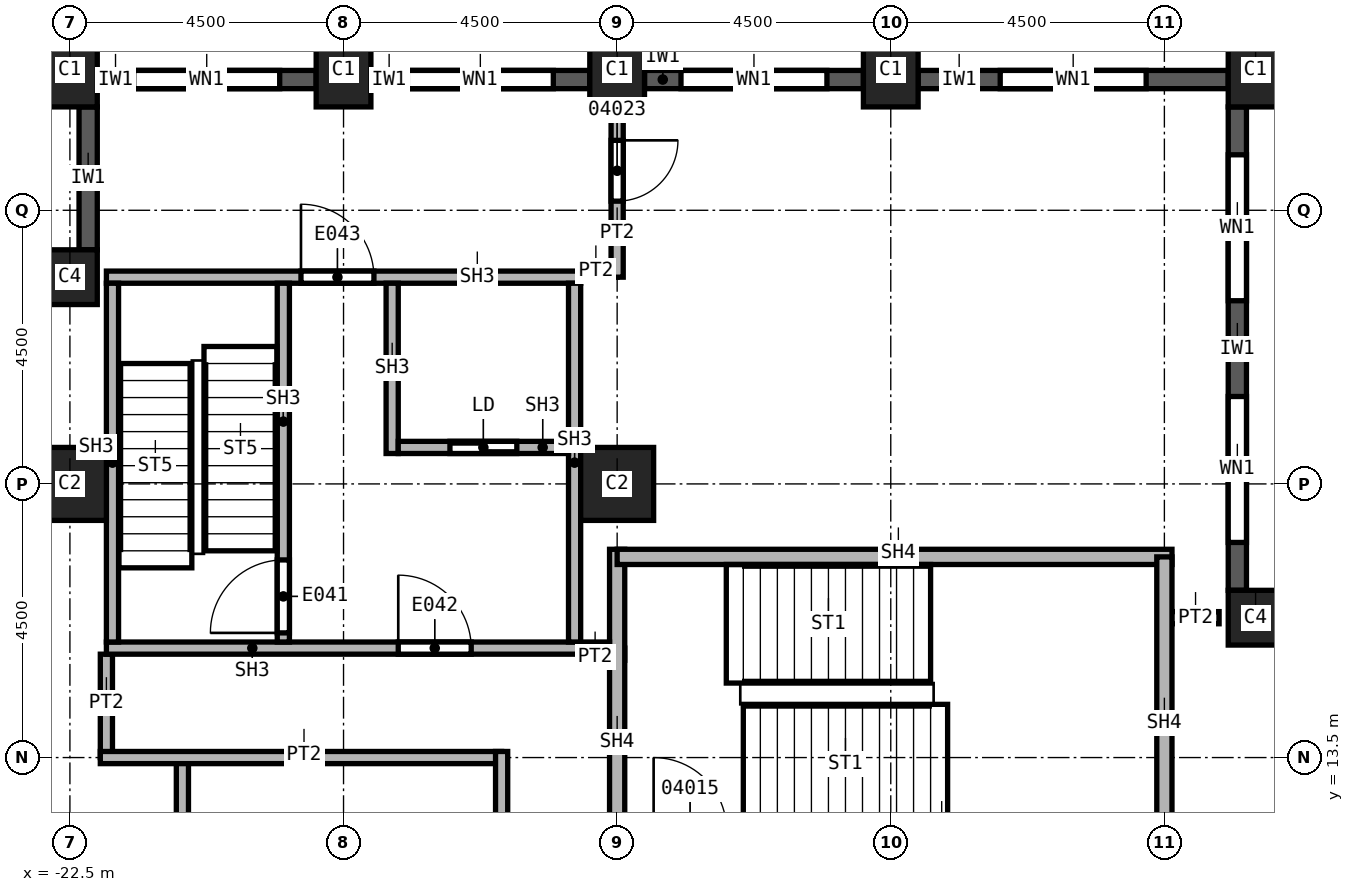
"""IFC4 building model, lengths in metres.
Left out: names, types, materials, properties, quantities, classifications, styles, units other than length and angle.
Written with IfcOpenShell. Run it as: python <this file> out.ifc"""

import sys

from ifc_helpers import new_model, si_unit, direction, frame, frame_2d, origin, origin_2d, place, context, subcontext, project, spatial, rectangle, extrude, element, fill, save


model = new_model("IFC4")
c1 = context("Model", 3, precision=1e-05, world=origin(), true_north=direction((0.0, 1.0)))
c2 = subcontext(c1, "Body", "Model", "MODEL_VIEW")
j1 = project(units=[si_unit("LENGTHUNIT", "METRE"), si_unit("PLANEANGLEUNIT", "RADIAN")], contexts=[c1])
p1 = place(None, origin())
s1 = spatial("IfcSite", under=j1, at=p1, CompositionType="ELEMENT")
p2 = place(p1, origin())
s2 = spatial("IfcBuilding", under=s1, at=p2, CompositionType="ELEMENT")
p3 = place(p2, frame((0.0, 0.0, 104.0)))
s3 = spatial("IfcBuildingStorey", under=s2, at=p3, CompositionType="ELEMENT", Elevation=104.0)
for number, where, z_axis, x_axis in (
    (1, (-13.5, 18.0, 0.0), (0.0, 0.0, 1.0), (1.0, 0.0, 0.0)),
    (2, (-22.5, 18.0, 0.0), (0.0, 0.0, 1.0), (1.0, 0.0, 0.0)),
):
    element("IfcColumn", number, at=place(p3, frame(where, z_axis=z_axis, x_axis=x_axis)), inside=s3, PredefinedType="COLUMN", context=c2, shape_type="SweptSolid", body=[
        extrude(rectangle(XDim=1.2, YDim=1.2, at=origin_2d()), origin(), (0.0, 0.0, 1.0), 3.7),
    ])
for number, where, z_axis, x_axis in (
    (3, (-3.0, 24.8, 0.0), (0.0, 0.0, 1.0), (1.0, 0.0, 0.0)),
    (4, (-9.0, 24.8, 0.0), (0.0, 0.0, 1.0), (1.0, 0.0, 0.0)),
    (5, (-13.5, 24.8, 0.0), (0.0, 0.0, 1.0), (1.0, 0.0, 0.0)),
    (6, (-18.0, 24.8, 0.0), (0.0, 0.0, 1.0), (1.0, 0.0, 0.0)),
    (7, (-22.5, 24.8, 0.0), (0.0, 0.0, 1.0), (1.0, 0.0, 0.0)),
):
    element("IfcColumn", number, at=place(p3, frame(where, z_axis=z_axis, x_axis=x_axis)), inside=s3, PredefinedType="COLUMN", context=c2, shape_type="SweptSolid", body=[
        extrude(rectangle(XDim=0.9, YDim=1.2, at=origin_2d()), origin(), (0.0, 0.0, 1.0), 3.7),
    ])
for number, where, z_axis, x_axis in (
    (8, (-3.0, 15.8, 0.0), (0.0, 0.0, 1.0), (1.0, 0.0, 0.0)),
    (9, (-22.5, 21.4, 0.0), (0.0, 0.0, 1.0), (1.0, 0.0, 0.0)),
):
    element("IfcColumn", number, at=place(p3, frame(where, z_axis=z_axis, x_axis=x_axis)), inside=s3, PredefinedType="COLUMN", context=c2, shape_type="SweptSolid", body=[
        extrude(rectangle(XDim=0.9, YDim=0.9, at=origin_2d()), origin(), (0.0, 0.0, 1.0), 3.7),
    ])
p4 = place(p3, frame((-22.2, 24.2, 0.0), z_axis=(0.0, 0.0, 1.0), x_axis=(0.0, -1.0, 0.0)))
e10 = element("IfcWall", 10, at=p4, inside=s3, PredefinedType="SOLIDWALL", context=c2, shape_type="SweptSolid", body=[
    extrude(rectangle(XDim=2.35, YDim=0.3, at=frame_2d((1.175, 0.0))), origin(), (0.0, 0.0, 1.0), 3.1),
])
p5 = place(p3, frame((-3.3, 16.25, 0.0), z_axis=(0.0, 0.0, 1.0), x_axis=(0.0, 1.0, 0.0)))
e11 = element("IfcWall", 11, at=p5, inside=s3, PredefinedType="SOLIDWALL", context=c2, shape_type="SweptSolid", body=[
    extrude(rectangle(XDim=7.95, YDim=0.3, at=frame_2d((3.975, 0.0))), origin(), (0.0, 0.0, 1.0), 3.1),
])
p6 = place(p5, frame((0.788, 0.0, 0.8)))
e12 = element("IfcOpeningElement", 12, at=p6, cuts=e11, PredefinedType="OPENING", context=c2, shape_type="SweptSolid", body=[
    extrude(rectangle(XDim=2.4, YDim=1.95, at=frame_2d((1.2, 0.975))), frame((0.0, 0.15, 0.0), z_axis=(0.0, -1.0, 0.0), x_axis=(1.0, 0.0, 0.0)), (0.0, 0.0, 1.0), 0.3),
])
p7 = place(p5, frame((4.762, 0.0, 0.8)))
e13 = element("IfcOpeningElement", 13, at=p7, cuts=e11, PredefinedType="OPENING", context=c2, shape_type="SweptSolid", body=[
    extrude(rectangle(XDim=2.4, YDim=1.95, at=frame_2d((1.2, 0.975))), frame((0.0, 0.15, 0.0), z_axis=(0.0, -1.0, 0.0), x_axis=(1.0, 0.0, 0.0)), (0.0, 0.0, 1.0), 0.3),
])
p8 = place(p3, frame((-3.45, 24.65, 0.0), z_axis=(0.0, 0.0, 1.0), x_axis=(-1.0, 0.0, 0.0)))
e14 = element("IfcWall", 14, at=p8, inside=s3, PredefinedType="SOLIDWALL", context=c2, shape_type="SweptSolid", body=[
    extrude(rectangle(XDim=5.1, YDim=0.3, at=frame_2d((2.55, 0.0))), origin(), (0.0, 0.0, 1.0), 3.1),
])
p9 = place(p8, frame((1.35, 0.0, 0.8)))
e15 = element("IfcOpeningElement", 15, at=p9, cuts=e14, PredefinedType="OPENING", context=c2, shape_type="SweptSolid", body=[
    extrude(rectangle(XDim=2.4, YDim=1.95, at=frame_2d((1.2, 0.975))), frame((0.0, 0.15, 0.0), z_axis=(0.0, -1.0, 0.0), x_axis=(1.0, 0.0, 0.0)), (0.0, 0.0, 1.0), 0.3),
])
p10 = place(p3, frame((-9.45, 24.65, 0.0), z_axis=(0.0, 0.0, 1.0), x_axis=(-1.0, 0.0, 0.0)))
e16 = element("IfcWall", 16, at=p10, inside=s3, PredefinedType="SOLIDWALL", context=c2, shape_type="SweptSolid", body=[
    extrude(rectangle(XDim=3.6, YDim=0.3, at=frame_2d((1.8, 0.0))), origin(), (0.0, 0.0, 1.0), 3.1),
])
p11 = place(p10, frame((0.6, 0.0, 0.8)))
e17 = element("IfcOpeningElement", 17, at=p11, cuts=e16, PredefinedType="OPENING", context=c2, shape_type="SweptSolid", body=[
    extrude(rectangle(XDim=2.4, YDim=1.95, at=frame_2d((1.2, 0.975))), frame((0.0, 0.15, 0.0), z_axis=(0.0, -1.0, 0.0), x_axis=(1.0, 0.0, 0.0)), (0.0, 0.0, 1.0), 0.3),
])
p12 = place(p3, frame((-13.95, 24.65, 0.0), z_axis=(0.0, 0.0, 1.0), x_axis=(-1.0, 0.0, 0.0)))
e18 = element("IfcWall", 18, at=p12, inside=s3, PredefinedType="SOLIDWALL", context=c2, shape_type="SweptSolid", body=[
    extrude(rectangle(XDim=3.6, YDim=0.3, at=frame_2d((1.8, 0.0))), origin(), (0.0, 0.0, 1.0), 3.1),
])
p13 = place(p12, frame((0.6, 0.0, 0.8)))
e19 = element("IfcOpeningElement", 19, at=p13, cuts=e18, PredefinedType="OPENING", context=c2, shape_type="SweptSolid", body=[
    extrude(rectangle(XDim=2.4, YDim=1.95, at=frame_2d((1.2, 0.975))), frame((0.0, 0.15, 0.0), z_axis=(0.0, -1.0, 0.0), x_axis=(1.0, 0.0, 0.0)), (0.0, 0.0, 1.0), 0.3),
])
p14 = place(p3, frame((-18.45, 24.65, 0.0), z_axis=(0.0, 0.0, 1.0), x_axis=(-1.0, 0.0, 0.0)))
e20 = element("IfcWall", 20, at=p14, inside=s3, PredefinedType="SOLIDWALL", context=c2, shape_type="SweptSolid", body=[
    extrude(rectangle(XDim=3.6, YDim=0.3, at=frame_2d((1.8, 0.0))), origin(), (0.0, 0.0, 1.0), 3.1),
])
p15 = place(p14, frame((0.6, 0.0, 0.8)))
e21 = element("IfcOpeningElement", 21, at=p15, cuts=e20, PredefinedType="OPENING", context=c2, shape_type="SweptSolid", body=[
    extrude(rectangle(XDim=2.4, YDim=1.95, at=frame_2d((1.2, 0.975))), frame((0.0, 0.15, 0.0), z_axis=(0.0, -1.0, 0.0), x_axis=(1.0, 0.0, 0.0)), (0.0, 0.0, 1.0), 0.3),
])
p16 = place(p3, frame((-21.9, 13.5, 0.0), z_axis=(0.0, 0.0, 1.0), x_axis=(0.0, 1.0, 0.0)))
e22 = element("IfcWall", 22, at=p16, inside=s3, PredefinedType="PARTITIONING", context=c2, shape_type="SweptSolid", body=[
    extrude(rectangle(XDim=1.7, YDim=0.2, at=frame_2d((0.85, 0.0))), origin(), (0.0, 0.0, 1.0), 3.7),
])
p17 = place(p3, frame((-20.65, 3.75, 0.0), z_axis=(0.0, 0.0, 1.0), x_axis=(0.0, 1.0, 0.0)))
e23 = element("IfcWall", 23, at=p17, inside=s3, PredefinedType="PARTITIONING", context=c2, shape_type="SweptSolid", body=[
    extrude(rectangle(XDim=9.75, YDim=0.2, at=frame_2d((4.875, 0.0))), origin(), (0.0, 0.0, 1.0), 3.7),
])
p18 = place(p17, frame((6.1, 0.0, 0.0)))
e24 = element("IfcOpeningElement", 24, at=p18, cuts=e23, PredefinedType="OPENING", context=c2, shape_type="SweptSolid", body=[
    extrude(rectangle(XDim=1.0, YDim=2.1, at=frame_2d((0.5, 1.05))), frame((0.0, 0.1, 0.0), z_axis=(0.0, -1.0, 0.0), x_axis=(1.0, 0.0, 0.0)), (0.0, 0.0, 1.0), 0.2),
])
p19 = place(p3, frame((-15.4, 13.5, 0.0), z_axis=(0.0, 0.0, 1.0), x_axis=(-1.0, 0.0, 0.0)))
e25 = element("IfcWall", 25, at=p19, inside=s3, PredefinedType="PARTITIONING", context=c2, shape_type="SweptSolid", body=[
    extrude(rectangle(XDim=6.6, YDim=0.2, at=frame_2d((3.3, 0.0))), origin(), (0.0, 0.0, 1.0), 3.7),
])
p20 = place(p3, frame((-15.4, 3.65, 0.0), z_axis=(0.0, 0.0, 1.0), x_axis=(0.0, 1.0, 0.0)))
e26 = element("IfcWall", 26, at=p20, inside=s3, PredefinedType="PARTITIONING", context=c2, shape_type="SweptSolid", body=[
    extrude(rectangle(XDim=9.95, YDim=0.2, at=frame_2d((4.975, 0.0))), origin(), (0.0, 0.0, 1.0), 3.7),
])
p21 = place(p20, frame((7.15, 0.0, 0.0)))
e27 = element("IfcOpeningElement", 27, at=p21, cuts=e26, PredefinedType="OPENING", context=c2, shape_type="SweptSolid", body=[
    extrude(rectangle(XDim=1.0, YDim=2.1, at=frame_2d((0.5, 1.05))), frame((0.0, 0.1, 0.0), z_axis=(0.0, -1.0, 0.0), x_axis=(1.0, 0.0, 0.0)), (0.0, 0.0, 1.0), 0.2),
])
p22 = place(p3, frame((-14.1, 15.2, 0.0), z_axis=(0.0, 0.0, 1.0), x_axis=(1.0, 0.0, 0.0)))
e28 = element("IfcWall", 28, at=p22, inside=s3, PredefinedType="PARTITIONING", context=c2, shape_type="SweptSolid", body=[
    extrude(rectangle(XDim=0.725, YDim=0.2, at=frame_2d((0.363, 0.0))), origin(), (0.0, 0.0, 1.0), 3.7),
])
p23 = place(p3, frame((-13.5, 21.5, 0.0), z_axis=(0.0, 0.0, 1.0), x_axis=(-1.0, 0.0, 0.0)))
e29 = element("IfcWall", 29, at=p23, inside=s3, PredefinedType="PARTITIONING", context=c2, shape_type="SweptSolid", body=[
    extrude(rectangle(XDim=0.6, YDim=0.2, at=frame_2d((0.3, 0.0))), origin(), (0.0, 0.0, 1.0), 3.7),
])
p24 = place(p3, frame((-13.5, 24.2, 0.0), z_axis=(0.0, 0.0, 1.0), x_axis=(0.0, -1.0, 0.0)))
e30 = element("IfcWall", 30, at=p24, inside=s3, PredefinedType="PARTITIONING", context=c2, shape_type="SweptSolid", body=[
    extrude(rectangle(XDim=2.8, YDim=0.2, at=frame_2d((1.4, 0.0))), origin(), (0.0, 0.0, 1.0), 3.7),
])
p25 = place(p24, frame((0.55, 0.0, 0.0)))
e31 = element("IfcOpeningElement", 31, at=p25, cuts=e30, PredefinedType="OPENING", context=c2, shape_type="SweptSolid", body=[
    extrude(rectangle(XDim=1.0, YDim=2.1, at=frame_2d((0.5, 1.05))), frame((0.0, 0.1, 0.0), z_axis=(0.0, -1.0, 0.0), x_axis=(1.0, 0.0, 0.0)), (0.0, 0.0, 1.0), 0.2),
])
p26 = place(p3, frame((-4.5, 15.8, 0.0), z_axis=(0.0, 0.0, 1.0), x_axis=(1.0, 0.0, 0.0)))
e32 = element("IfcWall", 32, at=p26, inside=s3, PredefinedType="PARTITIONING", context=c2, shape_type="SweptSolid", body=[
    extrude(rectangle(XDim=0.9, YDim=0.2, at=frame_2d((0.45, 0.0))), origin(), (0.0, 0.0, 1.0), 3.7),
])
p27 = place(p3, frame((-13.5, 12.175, 0.0), z_axis=(0.0, 0.0, 1.0), x_axis=(0.0, 1.0, 0.0)))
e33 = element("IfcWall", 33, at=p27, inside=s3, PredefinedType="SOLIDWALL", context=c2, shape_type="SweptSolid", body=[
    extrude(rectangle(XDim=4.75, YDim=0.25, at=frame_2d((2.375, 0.0))), origin(), (0.0, 0.0, 1.0), 3.7),
])
p28 = place(p3, frame((-13.5, 16.8, 0.0), z_axis=(0.0, 0.0, 1.0), x_axis=(1.0, 0.0, 0.0)))
e34 = element("IfcWall", 34, at=p28, inside=s3, PredefinedType="SOLIDWALL", context=c2, shape_type="SweptSolid", body=[
    extrude(rectangle(XDim=9.125, YDim=0.25, at=frame_2d((4.562, 0.0))), origin(), (0.0, 0.0, 1.0), 3.7),
])
p29 = place(p3, frame((-4.5, 16.8, 0.0), z_axis=(0.0, 0.0, 1.0), x_axis=(0.0, -1.0, 0.0)))
e35 = element("IfcWall", 35, at=p29, inside=s3, PredefinedType="SOLIDWALL", context=c2, shape_type="SweptSolid", body=[
    extrude(rectangle(XDim=4.5, YDim=0.25, at=frame_2d((2.25, 0.0))), origin(), (0.0, 0.0, 1.0), 3.7),
])
p30 = place(p3, frame((-21.9, 15.3, 0.0), z_axis=(0.0, 0.0, 1.0), x_axis=(1.0, 0.0, 0.0)))
e36 = element("IfcWall", 36, at=p30, inside=s3, PredefinedType="SOLIDWALL", context=c2, shape_type="SweptSolid", body=[
    extrude(rectangle(XDim=8.275, YDim=0.2, at=frame_2d((4.137, 0.0))), origin(), (0.0, 0.0, 1.0), 3.7),
])
p31 = place(p30, frame((4.8, 0.0, 0.0)))
e37 = element("IfcOpeningElement", 37, at=p31, cuts=e36, PredefinedType="OPENING", context=c2, shape_type="SweptSolid", body=[
    extrude(rectangle(XDim=1.2, YDim=2.1, at=frame_2d((0.6, 1.05))), frame((0.0, 0.1, 0.0), z_axis=(0.0, -1.0, 0.0), x_axis=(1.0, 0.0, 0.0)), (0.0, 0.0, 1.0), 0.2),
])
p32 = place(p3, frame((-21.9, 21.4, 0.0), z_axis=(0.0, 0.0, 1.0), x_axis=(1.0, 0.0, 0.0)))
e38 = element("IfcWall", 38, at=p32, inside=s3, PredefinedType="SOLIDWALL", context=c2, shape_type="SweptSolid", body=[
    extrude(rectangle(XDim=7.8, YDim=0.2, at=frame_2d((3.9, 0.0))), origin(), (0.0, 0.0, 1.0), 3.7),
])
p33 = place(p32, frame((3.2, 0.0, 0.0)))
e39 = element("IfcOpeningElement", 39, at=p33, cuts=e38, PredefinedType="OPENING", context=c2, shape_type="SweptSolid", body=[
    extrude(rectangle(XDim=1.2, YDim=2.1, at=frame_2d((0.6, 1.05))), frame((0.0, 0.1, 0.0), z_axis=(0.0, -1.0, 0.0), x_axis=(1.0, 0.0, 0.0)), (0.0, 0.0, 1.0), 0.2),
])
for number, where, z_axis, x_axis in (
    (40, (-21.8, 15.4, 0.0), (0.0, 0.0, 1.0), (0.0, 1.0, 0.0)),
    (41, (-14.2, 15.4, 0.0), (0.0, 0.0, 1.0), (0.0, 1.0, 0.0)),
):
    element("IfcWall", number, at=place(p3, frame(where, z_axis=z_axis, x_axis=x_axis)), inside=s3, PredefinedType="SOLIDWALL", context=c2, shape_type="SweptSolid", body=[
        extrude(rectangle(XDim=5.9, YDim=0.2, at=frame_2d((2.95, 0.0))), origin(), (0.0, 0.0, 1.0), 3.7),
    ])
p34 = place(p3, frame((-18.99, 15.4, 0.0), z_axis=(0.0, 0.0, 1.0), x_axis=(0.0, 1.0, 0.0)))
e42 = element("IfcWall", 42, at=p34, inside=s3, PredefinedType="SOLIDWALL", context=c2, shape_type="SweptSolid", body=[
    extrude(rectangle(XDim=5.9, YDim=0.2, at=frame_2d((2.95, 0.0))), origin(), (0.0, 0.0, 1.0), 3.7),
])
p35 = place(p34, frame((0.15, 0.0, 0.0)))
e43 = element("IfcOpeningElement", 43, at=p35, cuts=e42, PredefinedType="OPENING", context=c2, shape_type="SweptSolid", body=[
    extrude(rectangle(XDim=1.2, YDim=2.1, at=frame_2d((0.6, 1.05))), frame((0.0, 0.1, 0.0), z_axis=(0.0, -1.0, 0.0), x_axis=(1.0, 0.0, 0.0)), (0.0, 0.0, 1.0), 0.2),
])
p36 = place(p3, frame((-17.2, 18.5, 0.0), z_axis=(0.0, 0.0, 1.0), x_axis=(0.0, 1.0, 0.0)))
e44 = element("IfcWall", 44, at=p36, inside=s3, PredefinedType="SOLIDWALL", context=c2, shape_type="SweptSolid", body=[
    extrude(rectangle(XDim=2.8, YDim=0.2, at=frame_2d((1.4, 0.0))), origin(), (0.0, 0.0, 1.0), 3.7),
])
p37 = place(p3, frame((-17.1, 18.6, 0.0), z_axis=(0.0, 0.0, 1.0), x_axis=(1.0, 0.0, 0.0)))
e45 = element("IfcWall", 45, at=p37, inside=s3, PredefinedType="SOLIDWALL", context=c2, shape_type="SweptSolid", body=[
    extrude(rectangle(XDim=2.8, YDim=0.2, at=frame_2d((1.4, 0.0))), origin(), (0.0, 0.0, 1.0), 3.7),
])
p38 = place(p37, frame((0.85, 0.0, 0.0)))
e46 = element("IfcOpeningElement", 46, at=p38, cuts=e45, PredefinedType="OPENING", context=c2, shape_type="SweptSolid", body=[
    extrude(rectangle(XDim=1.1, YDim=2.1, at=frame_2d((0.55, 1.05))), frame((0.0, 0.1, 0.0), z_axis=(0.0, -1.0, 0.0), x_axis=(1.0, 0.0, 0.0)), (0.0, 0.0, 1.0), 0.2),
])
p39 = place(p6, origin())
e47 = element("IfcWindow", 47, at=p39, inside=s3, PartitioningType="SINGLE_PANEL", PredefinedType="WINDOW", context=c2, shape_type="SweptSolid", body=[
    extrude(rectangle(XDim=2.4, YDim=1.95, at=frame_2d((1.2, 0.975))), frame((0.0, 0.03, 0.0), z_axis=(0.0, -1.0, 0.0), x_axis=(1.0, 0.0, 0.0)), (0.0, 0.0, 1.0), 0.06),
])
fill(e12, e47)
p40 = place(p7, origin())
e48 = element("IfcWindow", 48, at=p40, inside=s3, PartitioningType="SINGLE_PANEL", PredefinedType="WINDOW", context=c2, shape_type="SweptSolid", body=[
    extrude(rectangle(XDim=2.4, YDim=1.95, at=frame_2d((1.2, 0.975))), frame((0.0, 0.03, 0.0), z_axis=(0.0, -1.0, 0.0), x_axis=(1.0, 0.0, 0.0)), (0.0, 0.0, 1.0), 0.06),
])
fill(e13, e48)
p41 = place(p9, origin())
e49 = element("IfcWindow", 49, at=p41, inside=s3, PartitioningType="SINGLE_PANEL", PredefinedType="WINDOW", context=c2, shape_type="SweptSolid", body=[
    extrude(rectangle(XDim=2.4, YDim=1.95, at=frame_2d((1.2, 0.975))), frame((0.0, 0.03, 0.0), z_axis=(0.0, -1.0, 0.0), x_axis=(1.0, 0.0, 0.0)), (0.0, 0.0, 1.0), 0.06),
])
fill(e15, e49)
p42 = place(p11, origin())
e50 = element("IfcWindow", 50, at=p42, inside=s3, PartitioningType="SINGLE_PANEL", PredefinedType="WINDOW", context=c2, shape_type="SweptSolid", body=[
    extrude(rectangle(XDim=2.4, YDim=1.95, at=frame_2d((1.2, 0.975))), frame((0.0, 0.03, 0.0), z_axis=(0.0, -1.0, 0.0), x_axis=(1.0, 0.0, 0.0)), (0.0, 0.0, 1.0), 0.06),
])
fill(e17, e50)
p43 = place(p13, origin())
e51 = element("IfcWindow", 51, at=p43, inside=s3, PartitioningType="SINGLE_PANEL", PredefinedType="WINDOW", context=c2, shape_type="SweptSolid", body=[
    extrude(rectangle(XDim=2.4, YDim=1.95, at=frame_2d((1.2, 0.975))), frame((0.0, 0.03, 0.0), z_axis=(0.0, -1.0, 0.0), x_axis=(1.0, 0.0, 0.0)), (0.0, 0.0, 1.0), 0.06),
])
fill(e19, e51)
p44 = place(p15, origin())
e52 = element("IfcWindow", 52, at=p44, inside=s3, PartitioningType="SINGLE_PANEL", PredefinedType="WINDOW", context=c2, shape_type="SweptSolid", body=[
    extrude(rectangle(XDim=2.4, YDim=1.95, at=frame_2d((1.2, 0.975))), frame((0.0, 0.03, 0.0), z_axis=(0.0, -1.0, 0.0), x_axis=(1.0, 0.0, 0.0)), (0.0, 0.0, 1.0), 0.06),
])
fill(e21, e52)
p45 = place(p25, origin())
e53 = element("IfcDoor", 53, at=p45, inside=s3, OperationType="SINGLE_SWING_RIGHT", PredefinedType="DOOR", context=c2, shape_type="SweptSolid", body=[
    extrude(rectangle(XDim=1.0, YDim=2.1, at=frame_2d((0.5, 1.05))), frame((0.0, 0.025, 0.0), z_axis=(0.0, -1.0, 0.0), x_axis=(1.0, 0.0, 0.0)), (0.0, 0.0, 1.0), 0.05),
])
fill(e31, e53)
p46 = place(p35, origin())
e54 = element("IfcDoor", 54, at=p46, inside=s3, OperationType="SINGLE_SWING_LEFT", PredefinedType="DOOR", context=c2, shape_type="SweptSolid", body=[
    extrude(rectangle(XDim=1.2, YDim=2.1, at=frame_2d((0.6, 1.05))), frame((0.0, 0.025, 0.0), z_axis=(0.0, -1.0, 0.0), x_axis=(1.0, 0.0, 0.0)), (0.0, 0.0, 1.0), 0.05),
])
fill(e43, e54)
p47 = place(p38, origin())
e55 = element("IfcDoor", 55, at=p47, inside=s3, OperationType="SLIDING_TO_LEFT", PredefinedType="DOOR", context=c2, shape_type="SweptSolid", body=[
    extrude(rectangle(XDim=1.1, YDim=2.1, at=frame_2d((0.55, 1.05))), frame((0.0, 0.025, 0.0), z_axis=(0.0, -1.0, 0.0), x_axis=(1.0, 0.0, 0.0)), (0.0, 0.0, 1.0), 0.05),
])
fill(e46, e55)
p48 = place(p31, origin())
e56 = element("IfcDoor", 56, at=p48, inside=s3, OperationType="SINGLE_SWING_RIGHT", PredefinedType="DOOR", context=c2, shape_type="SweptSolid", body=[
    extrude(rectangle(XDim=1.2, YDim=2.1, at=frame_2d((0.6, 1.05))), frame((0.0, 0.025, 0.0), z_axis=(0.0, -1.0, 0.0), x_axis=(1.0, 0.0, 0.0)), (0.0, 0.0, 1.0), 0.05),
])
fill(e37, e56)
p49 = place(p33, origin())
e57 = element("IfcDoor", 57, at=p49, inside=s3, OperationType="SINGLE_SWING_LEFT", PredefinedType="DOOR", context=c2, shape_type="SweptSolid", body=[
    extrude(rectangle(XDim=1.2, YDim=2.1, at=frame_2d((0.6, 1.05))), frame((0.0, 0.025, 0.0), z_axis=(0.0, -1.0, 0.0), x_axis=(1.0, 0.0, 0.0)), (0.0, 0.0, 1.0), 0.05),
])
fill(e39, e57)
save(model, sys.argv[1])
